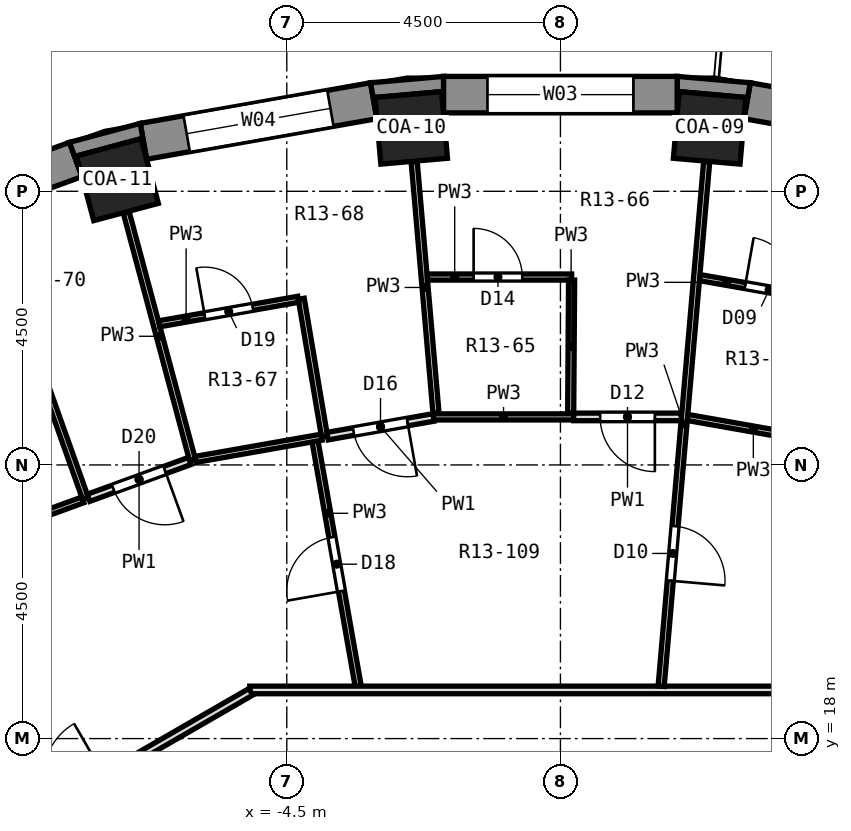
"""IFC4 building model, lengths in metres.
Left out: names, types, materials, properties, quantities, classifications, styles, units other than length and angle.
Written with IfcOpenShell. Run it as: python <this file> out.ifc"""

import sys

from ifc_helpers import new_model, si_unit, direction, frame, frame_2d, origin, origin_2d, place, context, subcontext, project, spatial, polyline, rectangle, outline, extrude, element, fill, save


model = new_model("IFC4")
c1 = context("Model", 3, precision=1e-05, world=origin(), true_north=direction((0.0, 1.0)))
c2 = subcontext(c1, "Body", "Model", "MODEL_VIEW")
j1 = project(units=[si_unit("LENGTHUNIT", "METRE"), si_unit("PLANEANGLEUNIT", "RADIAN")], contexts=[c1])
p1 = place(None, origin())
s1 = spatial("IfcSite", under=j1, at=p1, CompositionType="ELEMENT")
p2 = place(p1, origin())
s2 = spatial("IfcBuilding", under=s1, at=p2, CompositionType="ELEMENT")
p3 = place(p2, frame((0.0, 0.0, 65.9)))
s3 = spatial("IfcBuildingStorey", under=s2, at=p3, CompositionType="ELEMENT", Elevation=65.9)
for number, where, z_axis, x_axis in (
    (1, (2.453, 28.043, 0.0), (0.0, 0.0, 1.0), (0.087, 0.996, 0.0)),
    (2, (-2.453, 28.043, 0.0), (0.0, 0.0, 1.0), (-0.087, 0.996, 0.0)),
    (3, (-7.286, 27.191, 0.0), (0.0, 0.0, 1.0), (-0.259, 0.966, 0.0)),
):
    element("IfcColumn", number, at=place(p3, frame(where, z_axis=z_axis, x_axis=x_axis)), inside=s3, PredefinedType="COLUMN", context=c2, shape_type="SweptSolid", body=[
        extrude(rectangle(XDim=1.1, YDim=1.1, at=origin_2d()), origin(), (0.0, 0.0, 1.0), 3.3),
    ])
p4 = place(p3, frame((6.858, 27.821, 0.0), z_axis=(0.0, 0.0, 1.0), x_axis=(-0.984800809218, 0.173687553279, 0.0)))
e4 = element("IfcWall", 4, at=p4, inside=s3, PredefinedType="SOLIDWALL", context=c2, shape_type="SweptSolid", body=[
    extrude(rectangle(XDim=3.846, YDim=0.6, at=frame_2d((1.923, 0.0))), origin(), (0.0, 0.0, 1.0), 2.75),
])
p5 = place(p4, frame((0.723, 0.0, 0.9)))
e5 = element("IfcOpeningElement", 5, at=p5, cuts=e4, PredefinedType="OPENING", context=c2, shape_type="SweptSolid", body=[
    extrude(rectangle(XDim=2.4, YDim=1.8, at=frame_2d((1.2, 0.9))), frame((0.0, 0.312, 0.0), z_axis=(0.0, -1.0, 0.0), x_axis=(1.0, 0.0, 0.0)), (0.0, 0.0, 1.0), 0.624),
])
p6 = place(p3, frame((1.923, 28.59, 0.0), z_axis=(0.0, 0.0, 1.0), x_axis=(-1.0, 0.0, 0.0)))
e6 = element("IfcWall", 6, at=p6, inside=s3, PredefinedType="SOLIDWALL", context=c2, shape_type="SweptSolid", body=[
    extrude(rectangle(XDim=3.846, YDim=0.6, at=frame_2d((1.923, 0.0))), origin(), (0.0, 0.0, 1.0), 2.75),
])
p7 = place(p6, frame((0.723, 0.0, 0.9)))
e7 = element("IfcOpeningElement", 7, at=p7, cuts=e6, PredefinedType="OPENING", context=c2, shape_type="SweptSolid", body=[
    extrude(rectangle(XDim=2.4, YDim=1.8, at=frame_2d((1.2, 0.9))), frame((0.0, 0.312, 0.0), z_axis=(0.0, -1.0, 0.0), x_axis=(1.0, 0.0, 0.0)), (0.0, 0.0, 1.0), 0.624),
])
p8 = place(p3, frame((-3.071, 28.489, 0.0), z_axis=(0.0, 0.0, 1.0), x_axis=(-0.984800809218, -0.173687553279, 0.0)))
e8 = element("IfcWall", 8, at=p8, inside=s3, PredefinedType="SOLIDWALL", context=c2, shape_type="SweptSolid", body=[
    extrude(rectangle(XDim=3.846, YDim=0.6, at=frame_2d((1.923, 0.0))), origin(), (0.0, 0.0, 1.0), 2.75),
])
p9 = place(p8, frame((0.723, 0.0, 0.9)))
e9 = element("IfcOpeningElement", 9, at=p9, cuts=e8, PredefinedType="OPENING", context=c2, shape_type="SweptSolid", body=[
    extrude(rectangle(XDim=2.4, YDim=1.8, at=frame_2d((1.2, 0.9))), frame((0.0, 0.312, 0.0), z_axis=(0.0, -1.0, 0.0), x_axis=(1.0, 0.0, 0.0)), (0.0, 0.0, 1.0), 0.624),
])
p10 = place(p3, frame((-7.971, 27.523, 0.0), z_axis=(0.0, 0.0, 1.0), x_axis=(-0.939689588564, -0.342028474173, 0.0)))
e10 = element("IfcWall", 10, at=p10, inside=s3, PredefinedType="SOLIDWALL", context=c2, shape_type="SweptSolid", body=[
    extrude(rectangle(XDim=3.846, YDim=0.6, at=frame_2d((1.923, 0.0))), origin(), (0.0, 0.0, 1.0), 2.75),
])
p11 = place(p10, frame((0.723, 0.0, 0.9)))
e11 = element("IfcOpeningElement", 11, at=p11, cuts=e10, PredefinedType="OPENING", context=c2, shape_type="SweptSolid", body=[
    extrude(rectangle(XDim=2.4, YDim=1.8, at=frame_2d((1.2, 0.9))), frame((0.0, 0.312, 0.0), z_axis=(0.0, -1.0, 0.0), x_axis=(1.0, 0.0, 0.0)), (0.0, 0.0, 1.0), 0.624),
])
p12 = place(p3, origin())
e12 = element("IfcWall", 12, at=p12, inside=s3, PredefinedType="SOLIDWALL", context=c2, shape_type="SweptSolid", body=[
    extrude(outline(polyline([(3.123, 28.785), (1.923, 28.89), (1.923, 28.29), (1.954, 28.639), (3.049, 28.543), (3.019, 28.194), (3.123, 28.785)])), origin(), (0.0, 0.0, 1.0), 2.75),
])
p13 = place(p3, origin())
e13 = element("IfcWall", 13, at=p13, inside=s3, PredefinedType="SOLIDWALL", context=c2, shape_type="SweptSolid", body=[
    extrude(outline(polyline([(-1.923, 28.89), (-3.123, 28.785), (-3.019, 28.194), (-3.049, 28.543), (-1.954, 28.639), (-1.923, 28.29), (-1.923, 28.89)])), origin(), (0.0, 0.0, 1.0), 2.75),
])
p14 = place(p3, origin())
e14 = element("IfcWall", 14, at=p14, inside=s3, PredefinedType="SOLIDWALL", context=c2, shape_type="SweptSolid", body=[
    extrude(outline(polyline([(-6.91, 28.117), (-8.074, 27.805), (-7.869, 27.241), (-7.959, 27.58), (-6.897, 27.865), (-6.806, 27.526), (-6.91, 28.117)])), origin(), (0.0, 0.0, 1.0), 2.75),
])
p15 = place(p3, frame((-2.405, 27.485, 0.0), z_axis=(0.0, 0.0, 1.0), x_axis=(0.086512794622, -0.996250739707, 0.0)))
e15 = element("IfcWall", 15, at=p15, inside=s3, PredefinedType="PARTITIONING", context=c2, shape_type="SweptSolid", body=[
    extrude(rectangle(XDim=4.148, YDim=0.1, at=frame_2d((2.074, 0.0))), origin(), (0.0, 0.0, 1.0), 2.75),
])
p16 = place(p3, frame((-4.262, 25.233, 0.0), z_axis=(0.0, 0.0, 1.0), x_axis=(0.166550297596, -0.986032960083, 0.0)))
e16 = element("IfcWall", 16, at=p16, inside=s3, PredefinedType="PARTITIONING", context=c2, shape_type="SweptSolid", body=[
    extrude(rectangle(XDim=2.3, YDim=0.1, at=frame_2d((1.15, 0.0))), origin(), (0.0, 0.0, 1.0), 2.75),
])
p17 = place(p3, frame((-4.035, 22.887, 0.0), z_axis=(0.0, 0.0, 1.0), x_axis=(0.173584282426, -0.98481901733, 0.0)))
e17 = element("IfcWall", 17, at=p17, inside=s3, PredefinedType="PARTITIONING", context=c2, shape_type="SweptSolid", body=[
    extrude(rectangle(XDim=4.087, YDim=0.1, at=frame_2d((2.043, 0.0))), origin(), (0.0, 0.0, 1.0), 2.75),
])
p18 = place(p17, frame((1.6, 0.0, 0.0)))
e18 = element("IfcOpeningElement", 18, at=p18, cuts=e17, PredefinedType="OPENING", context=c2, shape_type="SweptSolid", body=[
    extrude(rectangle(XDim=0.9, YDim=2.1, at=frame_2d((0.45, 1.05))), frame((0.0, 0.062, 0.0), z_axis=(0.0, -1.0, 0.0), x_axis=(1.0, 0.0, 0.0)), (0.0, 0.0, 1.0), 0.124),
])
p19 = place(p3, frame((-7.14, 26.65, 0.0), z_axis=(0.0, 0.0, 1.0), x_axis=(0.258611481132, -0.965981418986, 0.0)))
e19 = element("IfcWall", 19, at=p19, inside=s3, PredefinedType="PARTITIONING", context=c2, shape_type="SweptSolid", body=[
    extrude(rectangle(XDim=4.211, YDim=0.1, at=frame_2d((2.106, 0.0))), origin(), (0.0, 0.0, 1.0), 2.75),
])
p20 = place(p3, frame((-8.579, 24.109, 0.0), z_axis=(0.0, 0.0, 1.0), x_axis=(0.335206501266, -0.942144681835, 0.0)))
e20 = element("IfcWall", 20, at=p20, inside=s3, PredefinedType="PARTITIONING", context=c2, shape_type="SweptSolid", body=[
    extrude(rectangle(XDim=2.3, YDim=0.1, at=frame_2d((1.15, 0.0))), origin(), (0.0, 0.0, 1.0), 2.75),
])
p21 = place(p3, frame((2.087, 23.281, 0.0), z_axis=(0.0, 0.0, 1.0), x_axis=(0.984790246942, -0.173747430277, 0.0)))
e21 = element("IfcWall", 21, at=p21, inside=s3, PredefinedType="PARTITIONING", context=c2, shape_type="SweptSolid", body=[
    extrude(rectangle(XDim=2.205, YDim=0.1, at=frame_2d((1.102, 0.0))), origin(), (0.0, 0.0, 1.0), 2.75),
])
p22 = place(p3, frame((2.289, 25.581, 0.0), z_axis=(0.0, 0.0, 1.0), x_axis=(0.984780450856, -0.173802944775, 0.0)))
e22 = element("IfcWall", 22, at=p22, inside=s3, PredefinedType="PARTITIONING", context=c2, shape_type="SweptSolid", body=[
    extrude(rectangle(XDim=2.373, YDim=0.1, at=frame_2d((1.186, 0.0))), origin(), (0.0, 0.0, 1.0), 2.75),
])
p23 = place(p22, frame((0.761, 0.0, 0.0)))
e23 = element("IfcOpeningElement", 23, at=p23, cuts=e22, PredefinedType="OPENING", context=c2, shape_type="SweptSolid", body=[
    extrude(rectangle(XDim=0.8, YDim=2.1, at=frame_2d((0.4, 1.05))), frame((0.0, 0.062, 0.0), z_axis=(0.0, -1.0, 0.0), x_axis=(1.0, 0.0, 0.0)), (0.0, 0.0, 1.0), 0.124),
])
p24 = place(p3, frame((-5.109, 18.8, 0.0), z_axis=(0.0, 0.0, 1.0), x_axis=(1.0, 0.0, 0.0)))
e24 = element("IfcWall", 24, at=p24, inside=s3, PredefinedType="PARTITIONING", context=c2, shape_type="SweptSolid", body=[
    extrude(rectangle(XDim=10.084, YDim=0.125, at=frame_2d((5.042, 0.0))), origin(), (0.0, 0.0, 1.0), 2.75),
])
p25 = place(p3, frame((-2.089, 23.29, 0.0), z_axis=(0.0, 0.0, 1.0), x_axis=(1.0, 0.0, 0.0)))
e25 = element("IfcWall", 25, at=p25, inside=s3, PredefinedType="PARTITIONING", context=c2, shape_type="SweptSolid", body=[
    extrude(rectangle(XDim=2.307, YDim=0.1, at=frame_2d((1.153, 0.0))), origin(), (0.0, 0.0, 1.0), 2.75),
])
p26 = place(p3, frame((0.218, 23.29, 0.0), z_axis=(0.0, 0.0, 1.0), x_axis=(1.0, 0.0, 0.0)))
e26 = element("IfcWall", 26, at=p26, inside=s3, PredefinedType="PARTITIONING", context=c2, shape_type="SweptSolid", body=[
    extrude(rectangle(XDim=1.77, YDim=0.125, at=frame_2d((0.885, 0.0))), origin(), (0.0, 0.0, 1.0), 2.75),
])
p27 = place(p26, frame((0.435, 0.0, 0.0)))
e27 = element("IfcOpeningElement", 27, at=p27, cuts=e26, PredefinedType="OPENING", context=c2, shape_type="SweptSolid", body=[
    extrude(rectangle(XDim=0.9, YDim=2.1, at=frame_2d((0.45, 1.05))), frame((0.0, 0.074, 0.0), z_axis=(0.0, -1.0, 0.0), x_axis=(1.0, 0.0, 0.0)), (0.0, 0.0, 1.0), 0.149),
])
p28 = place(p3, frame((-2.189, 25.59, 0.0), z_axis=(0.0, 0.0, 1.0), x_axis=(1.0, 0.0, 0.0)))
e28 = element("IfcWall", 28, at=p28, inside=s3, PredefinedType="PARTITIONING", context=c2, shape_type="SweptSolid", body=[
    extrude(rectangle(XDim=2.373, YDim=0.1, at=frame_2d((1.187, 0.0))), origin(), (0.0, 0.0, 1.0), 2.75),
])
p29 = place(p28, frame((0.761, 0.0, 0.0)))
e29 = element("IfcOpeningElement", 29, at=p29, cuts=e28, PredefinedType="OPENING", context=c2, shape_type="SweptSolid", body=[
    extrude(rectangle(XDim=0.8, YDim=2.1, at=frame_2d((0.4, 1.05))), frame((0.0, 0.062, 0.0), z_axis=(0.0, -1.0, 0.0), x_axis=(1.0, 0.0, 0.0)), (0.0, 0.0, 1.0), 0.124),
])
p30 = place(p3, frame((-6.002, 22.591, 0.0), z_axis=(0.0, 0.0, 1.0), x_axis=(0.984798730273, 0.173699340392, 0.0)))
e30 = element("IfcWall", 30, at=p30, inside=s3, PredefinedType="PARTITIONING", context=c2, shape_type="SweptSolid", body=[
    extrude(rectangle(XDim=2.105, YDim=0.1, at=frame_2d((1.053, 0.0))), origin(), (0.0, 0.0, 1.0), 2.75),
])
p31 = place(p3, frame((-3.83, 22.974, 0.0), z_axis=(0.0, 0.0, 1.0), x_axis=(0.98477522439, 0.17383255572, 0.0)))
e31 = element("IfcWall", 31, at=p31, inside=s3, PredefinedType="PARTITIONING", context=c2, shape_type="SweptSolid", body=[
    extrude(rectangle(XDim=1.77, YDim=0.125, at=frame_2d((0.885, 0.0))), origin(), (0.0, 0.0, 1.0), 2.75),
])
p32 = place(p31, frame((0.435, 0.0, 0.0)))
e32 = element("IfcOpeningElement", 32, at=p32, cuts=e31, PredefinedType="OPENING", context=c2, shape_type="SweptSolid", body=[
    extrude(rectangle(XDim=0.9, YDim=2.1, at=frame_2d((0.45, 1.05))), frame((0.0, 0.074, 0.0), z_axis=(0.0, -1.0, 0.0), x_axis=(1.0, 0.0, 0.0)), (0.0, 0.0, 1.0), 0.149),
])
p33 = place(p3, frame((-6.599, 24.821, 0.0), z_axis=(0.0, 0.0, 1.0), x_axis=(0.984793079882, 0.173731372577, 0.0)))
e33 = element("IfcWall", 33, at=p33, inside=s3, PredefinedType="PARTITIONING", context=c2, shape_type="SweptSolid", body=[
    extrude(rectangle(XDim=2.323, YDim=0.1, at=frame_2d((1.162, 0.0))), origin(), (0.0, 0.0, 1.0), 2.75),
])
p34 = place(p33, frame((0.761, 0.0, 0.0)))
e34 = element("IfcOpeningElement", 34, at=p34, cuts=e33, PredefinedType="OPENING", context=c2, shape_type="SweptSolid", body=[
    extrude(rectangle(XDim=0.8, YDim=2.1, at=frame_2d((0.4, 1.05))), frame((0.0, 0.062, 0.0), z_axis=(0.0, -1.0, 0.0), x_axis=(1.0, 0.0, 0.0)), (0.0, 0.0, 1.0), 0.124),
])
p35 = place(p3, frame((-9.833, 21.205, 0.0), z_axis=(0.0, 0.0, 1.0), x_axis=(0.939725675468, 0.341929312674, 0.0)))
e35 = element("IfcWall", 35, at=p35, inside=s3, PredefinedType="PARTITIONING", context=c2, shape_type="SweptSolid", body=[
    extrude(rectangle(XDim=2.105, YDim=0.1, at=frame_2d((1.052, 0.0))), origin(), (0.0, 0.0, 1.0), 2.75),
])
p36 = place(p3, frame((-7.761, 21.959, 0.0), z_axis=(0.0, 0.0, 1.0), x_axis=(0.939620127684, 0.342219250849, 0.0)))
e36 = element("IfcWall", 36, at=p36, inside=s3, PredefinedType="PARTITIONING", context=c2, shape_type="SweptSolid", body=[
    extrude(rectangle(XDim=1.77, YDim=0.125, at=frame_2d((0.885, 0.0))), origin(), (0.0, 0.0, 1.0), 2.75),
])
p37 = place(p36, frame((0.435, 0.0, 0.0)))
e37 = element("IfcOpeningElement", 37, at=p37, cuts=e36, PredefinedType="OPENING", context=c2, shape_type="SweptSolid", body=[
    extrude(rectangle(XDim=0.9, YDim=2.1, at=frame_2d((0.45, 1.05))), frame((0.0, 0.074, 0.0), z_axis=(0.0, -1.0, 0.0), x_axis=(1.0, 0.0, 0.0)), (0.0, 0.0, 1.0), 0.149),
])
p38 = place(p3, frame((-13.825, 13.727, 0.0), z_axis=(0.0, 0.0, 1.0), x_axis=(0.866059817553, 0.499940388867, 0.0)))
e38 = element("IfcWall", 38, at=p38, inside=s3, PredefinedType="PARTITIONING", context=c2, shape_type="SweptSolid", body=[
    extrude(rectangle(XDim=10.085, YDim=0.125, at=frame_2d((5.042, 0.0))), origin(), (0.0, 0.0, 1.0), 2.75),
])
p39 = place(p38, frame((6.306, 0.0, 0.0)))
e39 = element("IfcOpeningElement", 39, at=p39, cuts=e38, PredefinedType="OPENING", context=c2, shape_type="SweptSolid", body=[
    extrude(rectangle(XDim=1.0, YDim=2.1, at=frame_2d((0.5, 1.05))), frame((0.0, 0.074, 0.0), z_axis=(0.0, -1.0, 0.0), x_axis=(1.0, 0.0, 0.0)), (0.0, 0.0, 1.0), 0.149),
])
p40 = place(p3, frame((1.656, 18.862, 0.0), z_axis=(0.0, 0.0, 1.0), x_axis=(0.086481121159, 0.996253489672, 0.0)))
e40 = element("IfcWall", 40, at=p40, inside=s3, PredefinedType="PARTITIONING", context=c2, shape_type="SweptSolid", body=[
    extrude(rectangle(XDim=8.656, YDim=0.1, at=frame_2d((4.328, 0.0))), origin(), (0.0, 0.0, 1.0), 2.75),
])
p41 = place(p40, frame((1.741, 0.0, 0.0)))
e41 = element("IfcOpeningElement", 41, at=p41, cuts=e40, PredefinedType="OPENING", context=c2, shape_type="SweptSolid", body=[
    extrude(rectangle(XDim=0.9, YDim=2.1, at=frame_2d((0.45, 1.05))), frame((0.0, 0.062, 0.0), z_axis=(0.0, -1.0, 0.0), x_axis=(1.0, 0.0, 0.0)), (0.0, 0.0, 1.0), 0.124),
])
p42 = place(p3, frame((0.168, 23.353, 0.0), z_axis=(0.0, 0.0, 1.0), x_axis=(0.006919477202, 0.999976060131, 0.0)))
e42 = element("IfcWall", 42, at=p42, inside=s3, PredefinedType="PARTITIONING", context=c2, shape_type="SweptSolid", body=[
    extrude(rectangle(XDim=2.188, YDim=0.1, at=frame_2d((1.094, 0.0))), origin(), (0.0, 0.0, 1.0), 2.75),
])
p43 = place(p7, origin())
e43 = element("IfcWindow", 43, at=p43, inside=s3, PartitioningType="SINGLE_PANEL", PredefinedType="WINDOW", context=c2, shape_type="SweptSolid", body=[
    extrude(rectangle(XDim=2.4, YDim=1.8, at=frame_2d((1.2, 0.9))), frame((0.0, 0.18, 0.0), z_axis=(0.0, -1.0, 0.0), x_axis=(1.0, 0.0, 0.0)), (0.0, 0.0, 1.0), 0.06),
])
fill(e7, e43)
p44 = place(p9, origin())
e44 = element("IfcWindow", 44, at=p44, inside=s3, PartitioningType="SINGLE_PANEL", PredefinedType="WINDOW", context=c2, shape_type="SweptSolid", body=[
    extrude(rectangle(XDim=2.4, YDim=1.8, at=frame_2d((1.2, 0.9))), frame((0.0, 0.18, 0.0), z_axis=(0.0, -1.0, 0.0), x_axis=(1.0, 0.0, 0.0)), (0.0, 0.0, 1.0), 0.06),
])
fill(e9, e44)
p45 = place(p23, origin())
e45 = element("IfcDoor", 45, at=p45, inside=s3, OperationType="SINGLE_SWING_LEFT", PredefinedType="DOOR", context=c2, shape_type="SweptSolid", body=[
    extrude(rectangle(XDim=0.8, YDim=2.1, at=frame_2d((0.4, 1.05))), frame((0.0, 0.025, 0.0), z_axis=(0.0, -1.0, 0.0), x_axis=(1.0, 0.0, 0.0)), (0.0, 0.0, 1.0), 0.05),
])
fill(e23, e45)
p46 = place(p41, frame((0.9, 0.0, 0.0), z_axis=(0.0, 0.0, 1.0), x_axis=(-1.0, 0.0, 0.0)))
e46 = element("IfcDoor", 46, at=p46, inside=s3, OperationType="SINGLE_SWING_RIGHT", PredefinedType="DOOR", context=c2, shape_type="SweptSolid", body=[
    extrude(rectangle(XDim=0.9, YDim=2.1, at=frame_2d((0.45, 1.05))), frame((0.0, 0.025, 0.0), z_axis=(0.0, -1.0, 0.0), x_axis=(1.0, 0.0, 0.0)), (0.0, 0.0, 1.0), 0.05),
])
fill(e41, e46)
p47 = place(p27, frame((0.9, 0.0, 0.0), z_axis=(0.0, 0.0, 1.0), x_axis=(-1.0, 0.0, 0.0)))
e47 = element("IfcDoor", 47, at=p47, inside=s3, OperationType="SINGLE_SWING_LEFT", PredefinedType="DOOR", context=c2, shape_type="SweptSolid", body=[
    extrude(rectangle(XDim=0.9, YDim=2.1, at=frame_2d((0.45, 1.05))), frame((0.0, 0.025, 0.0), z_axis=(0.0, -1.0, 0.0), x_axis=(1.0, 0.0, 0.0)), (0.0, 0.0, 1.0), 0.05),
])
fill(e27, e47)
p48 = place(p29, origin())
e48 = element("IfcDoor", 48, at=p48, inside=s3, OperationType="SINGLE_SWING_LEFT", PredefinedType="DOOR", context=c2, shape_type="SweptSolid", body=[
    extrude(rectangle(XDim=0.8, YDim=2.1, at=frame_2d((0.4, 1.05))), frame((0.0, 0.025, 0.0), z_axis=(0.0, -1.0, 0.0), x_axis=(1.0, 0.0, 0.0)), (0.0, 0.0, 1.0), 0.05),
])
fill(e29, e48)
p49 = place(p32, frame((0.9, 0.0, 0.0), z_axis=(0.0, 0.0, 1.0), x_axis=(-1.0, 0.0, 0.0)))
e49 = element("IfcDoor", 49, at=p49, inside=s3, OperationType="SINGLE_SWING_LEFT", PredefinedType="DOOR", context=c2, shape_type="SweptSolid", body=[
    extrude(rectangle(XDim=0.9, YDim=2.1, at=frame_2d((0.45, 1.05))), frame((0.0, 0.025, 0.0), z_axis=(0.0, -1.0, 0.0), x_axis=(1.0, 0.0, 0.0)), (0.0, 0.0, 1.0), 0.05),
])
fill(e32, e49)
p50 = place(p18, frame((0.9, 0.0, 0.0), z_axis=(0.0, 0.0, 1.0), x_axis=(-1.0, 0.0, 0.0)))
e50 = element("IfcDoor", 50, at=p50, inside=s3, OperationType="SINGLE_SWING_LEFT", PredefinedType="DOOR", context=c2, shape_type="SweptSolid", body=[
    extrude(rectangle(XDim=0.9, YDim=2.1, at=frame_2d((0.45, 1.05))), frame((0.0, 0.025, 0.0), z_axis=(0.0, -1.0, 0.0), x_axis=(1.0, 0.0, 0.0)), (0.0, 0.0, 1.0), 0.05),
])
fill(e18, e50)
p51 = place(p34, origin())
e51 = element("IfcDoor", 51, at=p51, inside=s3, OperationType="SINGLE_SWING_LEFT", PredefinedType="DOOR", context=c2, shape_type="SweptSolid", body=[
    extrude(rectangle(XDim=0.8, YDim=2.1, at=frame_2d((0.4, 1.05))), frame((0.0, 0.025, 0.0), z_axis=(0.0, -1.0, 0.0), x_axis=(1.0, 0.0, 0.0)), (0.0, 0.0, 1.0), 0.05),
])
fill(e34, e51)
p52 = place(p37, frame((0.9, 0.0, 0.0), z_axis=(0.0, 0.0, 1.0), x_axis=(-1.0, 0.0, 0.0)))
e52 = element("IfcDoor", 52, at=p52, inside=s3, OperationType="SINGLE_SWING_LEFT", PredefinedType="DOOR", context=c2, shape_type="SweptSolid", body=[
    extrude(rectangle(XDim=0.9, YDim=2.1, at=frame_2d((0.45, 1.05))), frame((0.0, 0.025, 0.0), z_axis=(0.0, -1.0, 0.0), x_axis=(1.0, 0.0, 0.0)), (0.0, 0.0, 1.0), 0.05),
])
fill(e37, e52)
save(model, sys.argv[1])
